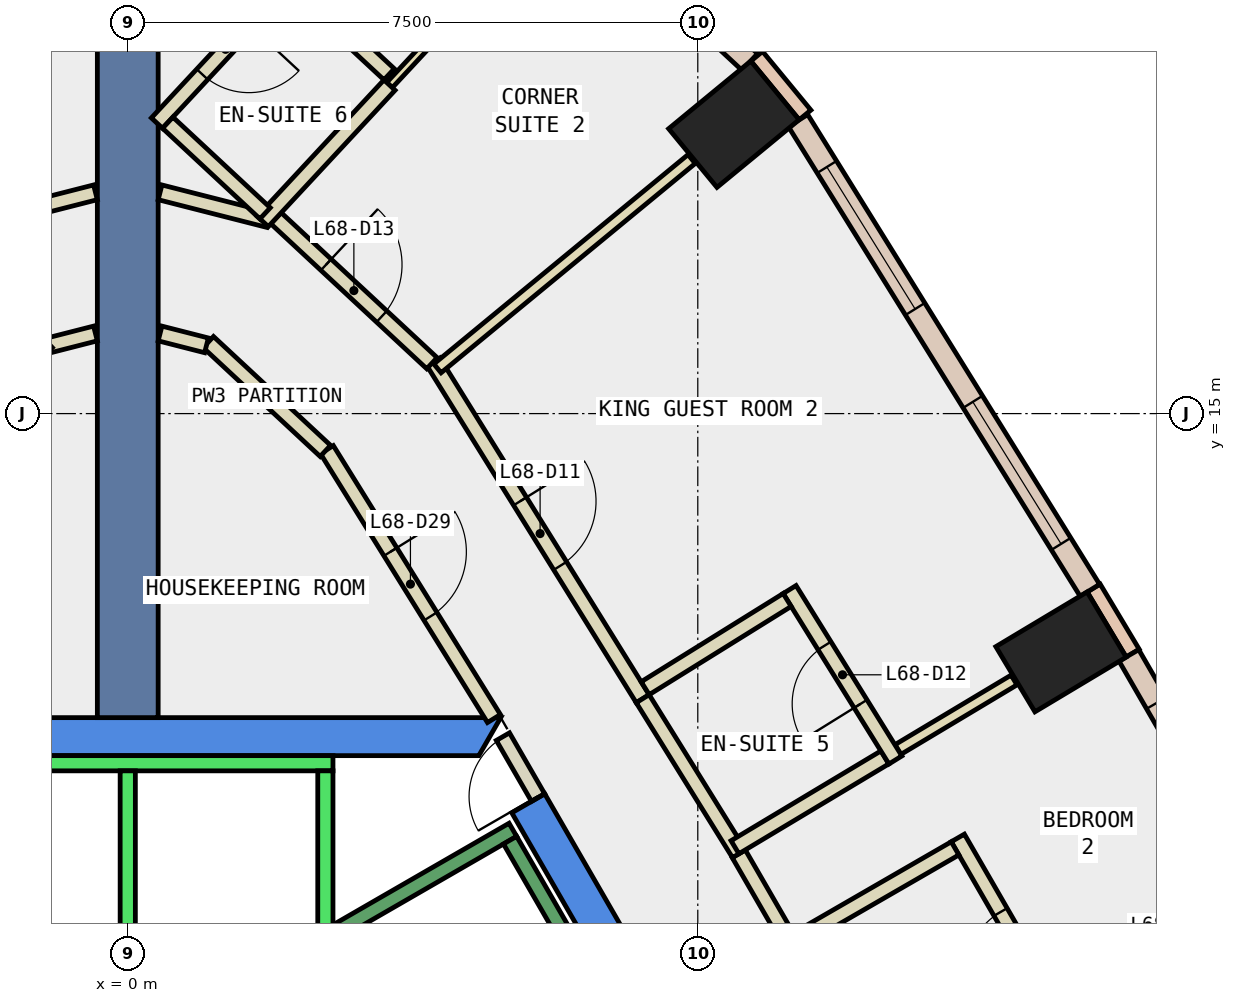
"""IFC4 building model, lengths in metres.
Left out: names, types, materials, properties, quantities, classifications, styles, units other than length and angle.
Written with IfcOpenShell. Run it as: python <this file> out.ifc"""

import sys

from ifc_helpers import new_model, si_unit, direction, frame, frame_2d, origin, origin_2d, place, context, subcontext, project, spatial, polyline, rectangle, outline, extrude, element, fill, save


model = new_model("IFC4")
c1 = context("Model", 3, precision=1e-05, world=origin(), true_north=direction((0.0, 1.0)))
c2 = subcontext(c1, "Body", "Model", "MODEL_VIEW")
j1 = project(units=[si_unit("LENGTHUNIT", "METRE"), si_unit("PLANEANGLEUNIT", "RADIAN")], contexts=[c1])
p1 = place(None, origin())
s1 = spatial("IfcSite", under=j1, at=p1, CompositionType="ELEMENT")
p2 = place(p1, origin())
s2 = spatial("IfcBuilding", under=s1, at=p2, CompositionType="ELEMENT")
p3 = place(p2, frame((0.0, 0.0, 293.6)))
s3 = spatial("IfcBuildingStorey", under=s2, at=p3, CompositionType="ELEMENT", Elevation=293.6)
for number, where, z_axis, x_axis in (
    (1, (12.279, 11.865, -0.34), (0.0, 0.0, 1.0), (-0.514, 0.858, 0.0)),
    (2, (7.975, 18.807, -0.34), (0.0, 0.0, 1.0), (-0.636, 0.772, 0.0)),
):
    element("IfcColumn", number, at=place(p3, frame(where, z_axis=z_axis, x_axis=x_axis)), inside=s3, PredefinedType="COLUMN", context=c2, shape_type="SweptSolid", body=[
        extrude(rectangle(XDim=1.0, YDim=1.4, at=origin_2d()), origin(), (0.0, 0.0, 1.0), 3.6),
    ])
p4 = place(p3, frame((0.0, 0.0, -0.34)))
e3 = element("IfcWall", 3, at=p4, inside=s3, PredefinedType="SHEAR", context=c2, shape_type="SweptSolid", body=[
    extrude(outline(polyline([(5.486, 9.998), (5.053, 9.748), (9.238, 2.5), (9.815, 2.5), (5.486, 9.998)])), origin(), (0.0, 0.0, 1.0), 3.6),
])
p5 = place(p3, frame((0.0, 0.0, -0.34)))
e4 = element("IfcWall", 4, at=p5, inside=s3, PredefinedType="SHEAR", context=c2, shape_type="SweptSolid", body=[
    extrude(outline(polyline([(4.907, 11.0), (-4.907, 11.0), (-4.619, 10.5), (4.619, 10.5), (4.907, 11.0)])), origin(), (0.0, 0.0, 1.0), 3.6),
])
p6 = place(p3, frame((0.0, 11.0, -0.34), z_axis=(0.0, 0.0, 1.0), x_axis=(0.0, 1.0, 0.0)))
e5 = element("IfcWall", 5, at=p6, inside=s3, PredefinedType="SHEAR", context=c2, shape_type="SweptSolid", body=[
    extrude(rectangle(XDim=9.0, YDim=0.8, at=frame_2d((4.5, 0.0))), origin(), (0.0, 0.0, 1.0), 3.6),
])
for number, where, z_axis, x_axis in (
    (6, (13.222, 11.848, 0.0), (0.0, 0.0, 1.0), (-0.514, 0.858, 0.0)),
    (7, (8.911, 18.929, 0.0), (0.0, 0.0, 1.0), (-0.636, 0.772, 0.0)),
):
    element("IfcWall", number, at=place(p3, frame(where, z_axis=z_axis, x_axis=x_axis)), inside=s3, PredefinedType="STANDARD", context=c2, shape_type="SweptSolid", body=[
        extrude(rectangle(XDim=1.0, YDim=0.2, at=frame_2d((0.5, 0.0))), origin(), (0.0, 0.0, 1.0), 3.26),
    ])
p7 = place(p3, frame((16.821, 5.498, 0.0), z_axis=(0.0, 0.0, 1.0), x_axis=(-0.499945412946, 0.866056917341, 0.0)))
e8 = element("IfcWall", 8, at=p7, inside=s3, PredefinedType="STANDARD", context=c2, shape_type="SweptSolid", body=[
    extrude(rectangle(XDim=7.299, YDim=0.3, at=frame_2d((3.649, 0.0))), origin(), (0.0, 0.0, 1.0), 3.26),
])
p8 = place(p7, frame((0.725, 0.0, 0.9)))
e9 = element("IfcOpeningElement", 9, at=p8, cuts=e8, PredefinedType="OPENING", context=c2, shape_type="SweptSolid", body=[
    extrude(rectangle(XDim=2.2, YDim=2.0, at=frame_2d((1.1, 1.0))), frame((0.0, 0.16, 0.0), z_axis=(0.0, -1.0, 0.0), x_axis=(1.0, 0.0, 0.0)), (0.0, 0.0, 1.0), 0.32),
])
p9 = place(p7, frame((4.374, 0.0, 0.9)))
e10 = element("IfcOpeningElement", 10, at=p9, cuts=e8, PredefinedType="OPENING", context=c2, shape_type="SweptSolid", body=[
    extrude(rectangle(XDim=2.2, YDim=2.0, at=frame_2d((1.1, 1.0))), frame((0.0, 0.16, 0.0), z_axis=(0.0, -1.0, 0.0), x_axis=(1.0, 0.0, 0.0)), (0.0, 0.0, 1.0), 0.32),
])
p10 = place(p3, frame((12.659, 12.675, 0.0), z_axis=(0.0, 0.0, 1.0), x_axis=(-0.527762071678, 0.849392250788, 0.0)))
e11 = element("IfcWall", 11, at=p10, inside=s3, PredefinedType="STANDARD", context=c2, shape_type="SweptSolid", body=[
    extrude(rectangle(XDim=7.276, YDim=0.3, at=frame_2d((3.638, 0.0))), origin(), (0.0, 0.0, 1.0), 3.26),
])
p11 = place(p10, frame((0.719, 0.0, 0.9)))
e12 = element("IfcOpeningElement", 12, at=p11, cuts=e11, PredefinedType="OPENING", context=c2, shape_type="SweptSolid", body=[
    extrude(rectangle(XDim=2.2, YDim=2.0, at=frame_2d((1.1, 1.0))), frame((0.0, 0.16, 0.0), z_axis=(0.0, -1.0, 0.0), x_axis=(1.0, 0.0, 0.0)), (0.0, 0.0, 1.0), 0.32),
])
p12 = place(p10, frame((4.357, 0.0, 0.9)))
e13 = element("IfcOpeningElement", 13, at=p12, cuts=e11, PredefinedType="OPENING", context=c2, shape_type="SweptSolid", body=[
    extrude(rectangle(XDim=2.2, YDim=2.0, at=frame_2d((1.1, 1.0))), frame((0.0, 0.16, 0.0), z_axis=(0.0, -1.0, 0.0), x_axis=(1.0, 0.0, 0.0)), (0.0, 0.0, 1.0), 0.32),
])
p13 = place(p3, frame((8.184, 19.626, 0.0), z_axis=(0.0, 0.0, 1.0), x_axis=(-0.732397380344, 0.680877431896, 0.0)))
e14 = element("IfcWall", 14, at=p13, inside=s3, PredefinedType="STANDARD", context=c2, shape_type="SweptSolid", body=[
    extrude(rectangle(XDim=4.019, YDim=0.3, at=frame_2d((2.009, 0.0))), origin(), (0.0, 0.0, 1.0), 3.26),
])
p14 = place(p13, frame((1.309, 0.0, 0.9)))
e15 = element("IfcOpeningElement", 15, at=p14, cuts=e14, PredefinedType="OPENING", context=c2, shape_type="SweptSolid", body=[
    extrude(rectangle(XDim=1.4, YDim=2.0, at=frame_2d((0.7, 1.0))), frame((0.0, 0.16, 0.0), z_axis=(0.0, -1.0, 0.0), x_axis=(1.0, 0.0, 0.0)), (0.0, 0.0, 1.0), 0.32),
])
p15 = place(p3, frame((2.62, 14.526, 0.0), z_axis=(0.0, 0.0, 1.0), x_axis=(0.527726136463, -0.84941457775, 0.0)))
e16 = element("IfcWall", 16, at=p15, inside=s3, PredefinedType="PARTITIONING", context=c2, shape_type="SweptSolid", body=[
    extrude(rectangle(XDim=4.165, YDim=0.2, at=frame_2d((2.083, 0.0))), origin(), (0.0, 0.0, 1.0), 2.4),
])
p16 = place(p15, frame((1.583, 0.0, 0.0)))
e17 = element("IfcOpeningElement", 17, at=p16, cuts=e16, PredefinedType="OPENING", context=c2, shape_type="SweptSolid", body=[
    extrude(rectangle(XDim=1.0, YDim=2.1, at=frame_2d((0.5, 1.05))), frame((0.0, 0.11, 0.0), z_axis=(0.0, -1.0, 0.0), x_axis=(1.0, 0.0, 0.0)), (0.0, 0.0, 1.0), 0.22),
])
p17 = place(p3, frame((2.6, 14.509, 0.0), z_axis=(0.0, 0.0, 1.0), x_axis=(-0.732355024595, 0.680922989735, 0.0)))
e18 = element("IfcWall", 18, at=p17, inside=s3, PredefinedType="PARTITIONING", context=c2, shape_type="SweptSolid", body=[
    extrude(rectangle(XDim=2.103, YDim=0.2, at=frame_2d((1.051, 0.0))), origin(), (0.0, 0.0, 1.0), 3.26),
])
for number, where, z_axis, x_axis in (
    (19, (1.036, 15.898, 0.0), (0.0, 0.0, 1.0), (-0.969, 0.247, 0.0)),
    (20, (-0.425, 16.054, 0.0), (0.0, 0.0, 1.0), (-0.969, -0.247, 0.0)),
):
    element("IfcWall", number, at=place(p3, frame(where, z_axis=z_axis, x_axis=x_axis)), inside=s3, PredefinedType="PARTITIONING", context=c2, shape_type="SweptSolid", body=[
        extrude(rectangle(XDim=0.63, YDim=0.2, at=frame_2d((0.315, 0.0))), origin(), (0.0, 0.0, 1.0), 3.26),
    ])
p18 = place(p3, frame((-1.06, 15.941, 0.0), z_axis=(0.0, 0.0, 1.0), x_axis=(-0.732355024595, -0.680922989735, 0.0)))
e21 = element("IfcWall", 21, at=p18, inside=s3, PredefinedType="PARTITIONING", context=c2, shape_type="SweptSolid", body=[
    extrude(rectangle(XDim=2.103, YDim=0.2, at=frame_2d((1.051, 0.0))), origin(), (0.0, 0.0, 1.0), 3.26),
])
p19 = place(p3, frame((8.039, 9.209, 0.0), z_axis=(0.0, 0.0, 1.0), x_axis=(0.500219543227, -0.865898613334, 0.0)))
e22 = element("IfcWall", 22, at=p19, inside=s3, PredefinedType="PARTITIONING", context=c2, shape_type="SweptSolid", body=[
    extrude(rectangle(XDim=1.261, YDim=0.2, at=frame_2d((0.631, 0.0))), origin(), (0.0, 0.0, 1.0), 3.26),
])
p20 = place(p3, frame((4.022, 15.68, 0.0), z_axis=(0.0, 0.0, 1.0), x_axis=(0.527737948498, -0.849407239029, 0.0)))
e23 = element("IfcWall", 23, at=p20, inside=s3, PredefinedType="PARTITIONING", context=c2, shape_type="SweptSolid", body=[
    extrude(rectangle(XDim=5.217, YDim=0.2, at=frame_2d((2.608, 0.0))), origin(), (0.0, 0.0, 1.0), 3.26),
])
p21 = place(p20, frame((2.159, 0.0, 0.0)))
e24 = element("IfcOpeningElement", 24, at=p21, cuts=e23, PredefinedType="OPENING", context=c2, shape_type="SweptSolid", body=[
    extrude(rectangle(XDim=1.0, YDim=2.1, at=frame_2d((0.5, 1.05))), frame((0.0, 0.11, 0.0), z_axis=(0.0, -1.0, 0.0), x_axis=(1.0, 0.0, 0.0)), (0.0, 0.0, 1.0), 0.22),
])
p22 = place(p3, frame((6.775, 11.249, 0.0), z_axis=(0.0, 0.0, 1.0), x_axis=(0.527803270752, -0.849366650736, 0.0)))
e25 = element("IfcWall", 25, at=p22, inside=s3, PredefinedType="PARTITIONING", context=c2, shape_type="SweptSolid", body=[
    extrude(rectangle(XDim=2.401, YDim=0.2, at=frame_2d((1.2, 0.0))), origin(), (0.0, 0.0, 1.0), 3.26),
])
p23 = place(p3, frame((1.949, 17.572, 0.0), z_axis=(0.0, 0.0, 1.0), x_axis=(0.732331154554, -0.680948661846, 0.0)))
e26 = element("IfcWall", 26, at=p23, inside=s3, PredefinedType="PARTITIONING", context=c2, shape_type="SweptSolid", body=[
    extrude(rectangle(XDim=2.803, YDim=0.2, at=frame_2d((1.402, 0.0))), origin(), (0.0, 0.0, 1.0), 3.26),
])
p24 = place(p23, frame((0.901, 0.0, 0.0)))
e27 = element("IfcOpeningElement", 27, at=p24, cuts=e26, PredefinedType="OPENING", context=c2, shape_type="SweptSolid", body=[
    extrude(rectangle(XDim=1.0, YDim=2.1, at=frame_2d((0.5, 1.05))), frame((0.0, 0.11, 0.0), z_axis=(0.0, -1.0, 0.0), x_axis=(1.0, 0.0, 0.0)), (0.0, 0.0, 1.0), 0.22),
])
p25 = place(p3, frame((-1.926, 17.528, 0.0), z_axis=(0.0, 0.0, 1.0), x_axis=(0.968981980879, 0.247131383542, 0.0)))
e28 = element("IfcWall", 28, at=p25, inside=s3, PredefinedType="PARTITIONING", context=c2, shape_type="SweptSolid", body=[
    extrude(rectangle(XDim=1.549, YDim=0.2, at=frame_2d((0.774, 0.0))), origin(), (0.0, 0.0, 1.0), 3.26),
])
p26 = place(p3, frame((0.425, 17.911, 0.0), z_axis=(0.0, 0.0, 1.0), x_axis=(0.969051069597, -0.246860334023, 0.0)))
e29 = element("IfcWall", 29, at=p26, inside=s3, PredefinedType="PARTITIONING", context=c2, shape_type="SweptSolid", body=[
    extrude(rectangle(XDim=1.474, YDim=0.2, at=frame_2d((0.737, 0.0))), origin(), (0.0, 0.0, 1.0), 3.26),
])
p27 = place(p3, frame((12.496, 6.689, 0.0), z_axis=(0.0, 0.0, 1.0), x_axis=(-0.500039995618, 0.866002311072, 0.0)))
e30 = element("IfcWall", 30, at=p27, inside=s3, PredefinedType="PARTITIONING", context=c2, shape_type="SweptSolid", body=[
    extrude(rectangle(XDim=3.15, YDim=0.2, at=frame_2d((1.575, 0.0))), origin(), (0.0, 0.0, 1.0), 3.26),
])
p28 = place(p27, frame((1.125, 0.0, 0.0)))
e31 = element("IfcOpeningElement", 31, at=p28, cuts=e30, PredefinedType="OPENING", context=c2, shape_type="SweptSolid", body=[
    extrude(rectangle(XDim=0.9, YDim=2.1, at=frame_2d((0.45, 1.05))), frame((0.0, 0.11, 0.0), z_axis=(0.0, -1.0, 0.0), x_axis=(1.0, 0.0, 0.0)), (0.0, 0.0, 1.0), 0.22),
])
p29 = place(p3, frame((10.885, 9.28, 0.0), z_axis=(0.0, 0.0, 1.0), x_axis=(-0.866022959057, -0.500004234368, 0.0)))
e32 = element("IfcWall", 32, at=p29, inside=s3, PredefinedType="PARTITIONING", context=c2, shape_type="SweptSolid", body=[
    extrude(rectangle(XDim=2.5, YDim=0.2, at=frame_2d((1.25, 0.0))), origin(), (0.0, 0.0, 1.0), 3.26),
])
p30 = place(p3, frame((10.133, 10.58, 0.0), z_axis=(0.0, 0.0, 1.0), x_axis=(0.857903919212, 0.513810145287, 0.0)))
e33 = element("IfcWall", 33, at=p30, inside=s3, PredefinedType="PARTITIONING", context=c2, shape_type="SweptSolid", body=[
    extrude(rectangle(XDim=1.781, YDim=0.15, at=frame_2d((0.891, 0.0))), origin(), (0.0, 0.0, 1.0), 3.26),
])
p31 = place(p3, frame((7.989, 9.295, 0.0), z_axis=(0.0, 0.0, 1.0), x_axis=(0.857801856135, 0.513980520654, 0.0)))
e34 = element("IfcWall", 34, at=p31, inside=s3, PredefinedType="PARTITIONING", context=c2, shape_type="SweptSolid", body=[
    extrude(rectangle(XDim=2.3, YDim=0.2, at=frame_2d((1.15, 0.0))), origin(), (0.0, 0.0, 1.0), 3.26),
])
p32 = place(p3, frame((10.1, 10.443, 0.0), z_axis=(0.0, 0.0, 1.0), x_axis=(-0.527510239672, 0.849548672555, 0.0)))
e35 = element("IfcWall", 35, at=p32, inside=s3, PredefinedType="PARTITIONING", context=c2, shape_type="SweptSolid", body=[
    extrude(rectangle(XDim=2.639, YDim=0.2, at=frame_2d((1.319, 0.0))), origin(), (0.0, 0.0, 1.0), 3.26),
])
p33 = place(p32, frame((0.869, 0.0, 0.0)))
e36 = element("IfcOpeningElement", 36, at=p33, cuts=e35, PredefinedType="OPENING", context=c2, shape_type="SweptSolid", body=[
    extrude(rectangle(XDim=0.9, YDim=2.1, at=frame_2d((0.45, 1.05))), frame((0.0, 0.11, 0.0), z_axis=(0.0, -1.0, 0.0), x_axis=(1.0, 0.0, 0.0)), (0.0, 0.0, 1.0), 0.22),
])
p34 = place(p3, frame((8.676, 12.548, 0.0), z_axis=(0.0, 0.0, 1.0), x_axis=(-0.849286670427, -0.527931957202, 0.0)))
e37 = element("IfcWall", 37, at=p34, inside=s3, PredefinedType="PARTITIONING", context=c2, shape_type="SweptSolid", body=[
    extrude(rectangle(XDim=2.199, YDim=0.2, at=frame_2d((1.1, 0.0))), origin(), (0.0, 0.0, 1.0), 3.26),
])
p35 = place(p3, frame((4.075, 15.595, 0.0), z_axis=(0.0, 0.0, 1.0), x_axis=(0.771899326406, 0.635744783616, 0.0)))
e38 = element("IfcWall", 38, at=p35, inside=s3, PredefinedType="PARTITIONING", context=c2, shape_type="SweptSolid", body=[
    extrude(rectangle(XDim=4.332, YDim=0.15, at=frame_2d((2.166, 0.0))), origin(), (0.0, 0.0, 1.0), 3.26),
])
p36 = place(p3, frame((3.444, 19.322, 0.0), z_axis=(0.0, 0.0, 1.0), x_axis=(0.68085394361, 0.732419215662, 0.0)))
e39 = element("IfcWall", 39, at=p36, inside=s3, PredefinedType="PARTITIONING", context=c2, shape_type="SweptSolid", body=[
    extrude(rectangle(XDim=3.3, YDim=0.1, at=frame_2d((1.65, 0.0))), origin(), (0.0, 0.0, 1.0), 3.26),
])
p37 = place(p36, frame((1.2, 0.0, 0.0)))
e40 = element("IfcOpeningElement", 40, at=p37, cuts=e39, PredefinedType="OPENING", context=c2, shape_type="SweptSolid", body=[
    extrude(rectangle(XDim=0.9, YDim=2.1, at=frame_2d((0.45, 1.05))), frame((0.0, 0.06, 0.0), z_axis=(0.0, -1.0, 0.0), x_axis=(1.0, 0.0, 0.0)), (0.0, 0.0, 1.0), 0.12),
])
p38 = place(p3, frame((1.776, 17.528, 0.0), z_axis=(0.0, 0.0, 1.0), x_axis=(0.680978439741, 0.732303464834, 0.0)))
e41 = element("IfcWall", 41, at=p38, inside=s3, PredefinedType="PARTITIONING", context=c2, shape_type="SweptSolid", body=[
    extrude(rectangle(XDim=2.45, YDim=0.2, at=frame_2d((1.225, 0.0))), origin(), (0.0, 0.0, 1.0), 3.26),
])
p39 = place(p3, frame((3.439, 19.464, 0.0), z_axis=(0.0, 0.0, 1.0), x_axis=(-0.732491549411, 0.68077612329, 0.0)))
e42 = element("IfcWall", 42, at=p39, inside=s3, PredefinedType="PARTITIONING", context=c2, shape_type="SweptSolid", body=[
    extrude(rectangle(XDim=1.699, YDim=0.2, at=frame_2d((0.85, 0.0))), origin(), (0.0, 0.0, 1.0), 3.26),
])
p40 = place(p3, frame((2.189, 20.763, 0.0), z_axis=(0.0, 0.0, 1.0), x_axis=(-0.680987945319, -0.73229462536, 0.0)))
e43 = element("IfcWall", 43, at=p40, inside=s3, PredefinedType="PARTITIONING", context=c2, shape_type="SweptSolid", body=[
    extrude(rectangle(XDim=2.65, YDim=0.2, at=frame_2d((1.325, 0.0))), origin(), (0.0, 0.0, 1.0), 3.26),
])
p41 = place(p40, frame((0.875, 0.0, 0.0)))
e44 = element("IfcOpeningElement", 44, at=p41, cuts=e43, PredefinedType="OPENING", context=c2, shape_type="SweptSolid", body=[
    extrude(rectangle(XDim=0.9, YDim=2.1, at=frame_2d((0.45, 1.05))), frame((0.0, 0.11, 0.0), z_axis=(0.0, -1.0, 0.0), x_axis=(1.0, 0.0, 0.0)), (0.0, 0.0, 1.0), 0.22),
])
p42 = place(p3, frame((0.526, 18.827, 0.0), z_axis=(0.0, 0.0, 1.0), x_axis=(0.732112296378, -0.681183958628, 0.0)))
e45 = element("IfcWall", 45, at=p42, inside=s3, PredefinedType="PARTITIONING", context=c2, shape_type="SweptSolid", body=[
    extrude(rectangle(XDim=1.75, YDim=0.2, at=frame_2d((0.875, 0.0))), origin(), (0.0, 0.0, 1.0), 3.26),
])
p43 = place(p3, frame((5.399, 9.948, 0.0), z_axis=(0.0, 0.0, 1.0), x_axis=(-0.499882215713, 0.866093395895, 0.0)))
e46 = element("IfcWall", 46, at=p43, inside=s3, PredefinedType="PARTITIONING", context=c2, shape_type="SweptSolid", body=[
    extrude(rectangle(XDim=0.926, YDim=0.2, at=frame_2d((0.463, 0.0))), origin(), (0.0, 0.0, 1.0), 2.4),
])
p44 = place(p43, frame((0.017, 0.0, 0.0)))
e47 = element("IfcOpeningElement", 47, at=p44, cuts=e46, PredefinedType="OPENING", context=c2, shape_type="SweptSolid", body=[
    extrude(rectangle(XDim=0.9, YDim=2.1, at=frame_2d((0.45, 1.05))), frame((0.0, 0.11, 0.0), z_axis=(0.0, -1.0, 0.0), x_axis=(1.0, 0.0, 0.0)), (0.0, 0.0, 1.0), 0.22),
])
p45 = place(p3, frame((2.7, 10.4, 0.0), z_axis=(0.0, 0.0, 1.0), x_axis=(-1.0, 0.0, 0.0)))
e48 = element("IfcWall", 48, at=p45, inside=s3, PredefinedType="STANDARD", context=c2, shape_type="SweptSolid", body=[
    extrude(rectangle(XDim=5.4, YDim=0.2, at=frame_2d((2.7, 0.0))), origin(), (0.0, 0.0, 1.0), 3.26),
])
for number, where, z_axis, x_axis in (
    (49, (2.6, 7.9, 0.0), (0.0, 0.0, 1.0), (0.0, 1.0, 0.0)),
    (50, (0.0, 7.9, 0.0), (0.0, 0.0, 1.0), (0.0, 1.0, 0.0)),
):
    element("IfcWall", number, at=place(p3, frame(where, z_axis=z_axis, x_axis=x_axis)), inside=s3, PredefinedType="STANDARD", context=c2, shape_type="SweptSolid", body=[
        extrude(rectangle(XDim=2.4, YDim=0.2, at=frame_2d((1.2, 0.0))), origin(), (0.0, 0.0, 1.0), 3.26),
    ])
p46 = place(p3, frame((2.7, 8.158, 0.0), z_axis=(0.0, 0.0, 1.0), x_axis=(0.86611865017, 0.499838457731, 0.0)))
e51 = element("IfcWall", 51, at=p46, inside=s3, PredefinedType="STANDARD", context=c2, shape_type="SweptSolid", body=[
    extrude(rectangle(XDim=2.733, YDim=0.2, at=frame_2d((1.366, 0.0))), origin(), (0.0, 0.0, 1.0), 3.26),
])
p47 = place(p3, frame((8.48, 3.412, 0.0), z_axis=(0.0, 0.0, 1.0), x_axis=(-0.499978703459, 0.866037698999, 0.0)))
e52 = element("IfcWall", 52, at=p47, inside=s3, PredefinedType="STANDARD", context=c2, shape_type="SweptSolid", body=[
    extrude(rectangle(XDim=6.9, YDim=0.2, at=frame_2d((3.45, 0.0))), origin(), (0.0, 0.0, 1.0), 3.26),
])
p48 = place(p9, origin())
e53 = element("IfcWindow", 53, at=p48, inside=s3, PartitioningType="SINGLE_PANEL", PredefinedType="WINDOW", context=c2, shape_type="SweptSolid", body=[
    extrude(rectangle(XDim=2.2, YDim=2.0, at=frame_2d((1.1, 1.0))), frame((0.0, 0.03, 0.0), z_axis=(0.0, -1.0, 0.0), x_axis=(1.0, 0.0, 0.0)), (0.0, 0.0, 1.0), 0.06),
])
fill(e10, e53)
p49 = place(p11, origin())
e54 = element("IfcWindow", 54, at=p49, inside=s3, PartitioningType="SINGLE_PANEL", PredefinedType="WINDOW", context=c2, shape_type="SweptSolid", body=[
    extrude(rectangle(XDim=2.2, YDim=2.0, at=frame_2d((1.1, 1.0))), frame((0.0, 0.03, 0.0), z_axis=(0.0, -1.0, 0.0), x_axis=(1.0, 0.0, 0.0)), (0.0, 0.0, 1.0), 0.06),
])
fill(e12, e54)
p50 = place(p12, origin())
e55 = element("IfcWindow", 55, at=p50, inside=s3, PartitioningType="SINGLE_PANEL", PredefinedType="WINDOW", context=c2, shape_type="SweptSolid", body=[
    extrude(rectangle(XDim=2.2, YDim=2.0, at=frame_2d((1.1, 1.0))), frame((0.0, 0.03, 0.0), z_axis=(0.0, -1.0, 0.0), x_axis=(1.0, 0.0, 0.0)), (0.0, 0.0, 1.0), 0.06),
])
fill(e13, e55)
p51 = place(p28, origin())
e56 = element("IfcDoor", 56, at=p51, inside=s3, OperationType="SINGLE_SWING_RIGHT", PredefinedType="DOOR", context=c2, shape_type="SweptSolid", body=[
    extrude(rectangle(XDim=0.9, YDim=2.1, at=frame_2d((0.45, 1.05))), frame((0.0, 0.025, 0.0), z_axis=(0.0, -1.0, 0.0), x_axis=(1.0, 0.0, 0.0)), (0.0, 0.0, 1.0), 0.05),
])
fill(e31, e56)
p52 = place(p21, origin())
e57 = element("IfcDoor", 57, at=p52, inside=s3, OperationType="SINGLE_SWING_LEFT", PredefinedType="DOOR", context=c2, shape_type="SweptSolid", body=[
    extrude(rectangle(XDim=1.0, YDim=2.1, at=frame_2d((0.5, 1.05))), frame((0.0, 0.025, 0.0), z_axis=(0.0, -1.0, 0.0), x_axis=(1.0, 0.0, 0.0)), (0.0, 0.0, 1.0), 0.05),
])
fill(e24, e57)
p53 = place(p33, origin())
e58 = element("IfcDoor", 58, at=p53, inside=s3, OperationType="SINGLE_SWING_LEFT", PredefinedType="DOOR", context=c2, shape_type="SweptSolid", body=[
    extrude(rectangle(XDim=0.9, YDim=2.1, at=frame_2d((0.45, 1.05))), frame((0.0, 0.025, 0.0), z_axis=(0.0, -1.0, 0.0), x_axis=(1.0, 0.0, 0.0)), (0.0, 0.0, 1.0), 0.05),
])
fill(e36, e58)
p54 = place(p24, origin())
e59 = element("IfcDoor", 59, at=p54, inside=s3, OperationType="SINGLE_SWING_LEFT", PredefinedType="DOOR", context=c2, shape_type="SweptSolid", body=[
    extrude(rectangle(XDim=1.0, YDim=2.1, at=frame_2d((0.5, 1.05))), frame((0.0, 0.025, 0.0), z_axis=(0.0, -1.0, 0.0), x_axis=(1.0, 0.0, 0.0)), (0.0, 0.0, 1.0), 0.05),
])
fill(e27, e59)
p55 = place(p41, origin())
e60 = element("IfcDoor", 60, at=p55, inside=s3, OperationType="SINGLE_SWING_LEFT", PredefinedType="DOOR", context=c2, shape_type="SweptSolid", body=[
    extrude(rectangle(XDim=0.9, YDim=2.1, at=frame_2d((0.45, 1.05))), frame((0.0, 0.025, 0.0), z_axis=(0.0, -1.0, 0.0), x_axis=(1.0, 0.0, 0.0)), (0.0, 0.0, 1.0), 0.05),
])
fill(e44, e60)
p56 = place(p16, origin())
e61 = element("IfcDoor", 61, at=p56, inside=s3, OperationType="SINGLE_SWING_RIGHT", PredefinedType="DOOR", context=c2, shape_type="SweptSolid", body=[
    extrude(rectangle(XDim=1.0, YDim=2.1, at=frame_2d((0.5, 1.05))), frame((0.0, 0.025, 0.0), z_axis=(0.0, -1.0, 0.0), x_axis=(1.0, 0.0, 0.0)), (0.0, 0.0, 1.0), 0.05),
])
fill(e17, e61)
p57 = place(p44, origin())
e62 = element("IfcDoor", 62, at=p57, inside=s3, OperationType="SINGLE_SWING_LEFT", PredefinedType="DOOR", context=c2, shape_type="SweptSolid", body=[
    extrude(rectangle(XDim=0.9, YDim=2.1, at=frame_2d((0.45, 1.05))), frame((0.0, 0.025, 0.0), z_axis=(0.0, -1.0, 0.0), x_axis=(1.0, 0.0, 0.0)), (0.0, 0.0, 1.0), 0.05),
])
fill(e47, e62)
save(model, sys.argv[1])
